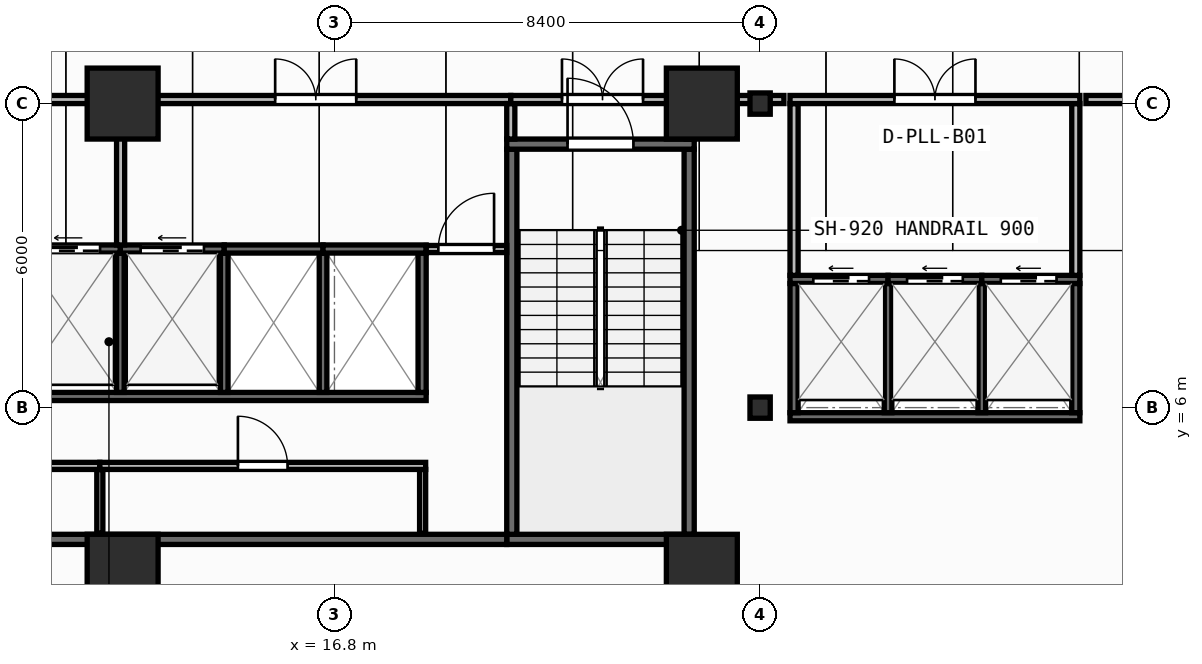
"""IFC4 building model, lengths in metres.
Left out: names, types, materials, properties, quantities, classifications, styles, units other than length and angle.
Written with IfcOpenShell. Run it as: python <this file> out.ifc"""

import sys

from ifc_helpers import new_model, si_unit, direction, frame, frame_2d, origin, origin_2d, place, context, subcontext, project, spatial, rectangle, i_section, extrude, element, fill, save


model = new_model("IFC4")
c1 = context("Model", 3, precision=1e-05, world=origin(), true_north=direction((0.0, 1.0)))
c2 = subcontext(c1, "Body", "Model", "MODEL_VIEW")
j1 = project(units=[si_unit("LENGTHUNIT", "METRE"), si_unit("PLANEANGLEUNIT", "RADIAN")], contexts=[c1])
p1 = place(None, origin())
s1 = spatial("IfcSite", under=j1, at=p1, CompositionType="ELEMENT")
p2 = place(p1, origin())
s2 = spatial("IfcBuilding", under=s1, at=p2, CompositionType="ELEMENT")
p3 = place(p2, frame((0.0, 0.0, -4.5)))
s3 = spatial("IfcBuildingStorey", under=s2, at=p3, CompositionType="ELEMENT", Elevation=-4.5)
for number, where, z_axis, x_axis in (
    (1, (12.62, 2.8, 0.0), (0.0, 0.0, 1.0), (1.0, 0.0, 0.0)),
    (2, (24.05, 2.8, 0.0), (0.0, 0.0, 1.0), (1.0, 0.0, 0.0)),
):
    element("IfcColumn", number, at=place(p3, frame(where, z_axis=z_axis, x_axis=x_axis)), inside=s3, PredefinedType="COLUMN", context=c2, shape_type="SweptSolid", body=[
        extrude(rectangle(XDim=1.4, YDim=1.4, at=origin_2d()), origin(), (0.0, 0.0, 1.0), 4.5),
    ])
p4 = place(p3, frame((25.2, 6.0, 0.0), z_axis=(0.0, 0.0, 1.0), x_axis=(1.0, 0.0, 0.0)))
e3 = element("IfcColumn", 3, at=p4, inside=s3, PredefinedType="COLUMN", context=c2, shape_type="SweptSolid", body=[
    extrude(i_section(OverallWidth=0.4, OverallDepth=0.42, WebThickness=0.025, FlangeThickness=0.04, at=origin_2d()), origin(), (0.0, 0.0, 1.0), 4.5),
])
for number, where, z_axis, x_axis in (
    (4, (12.62, 12.0, 0.0), (0.0, 0.0, 1.0), (1.0, 0.0, 0.0)),
    (5, (24.05, 12.0, 0.0), (0.0, 0.0, 1.0), (1.0, 0.0, 0.0)),
):
    element("IfcColumn", number, at=place(p3, frame(where, z_axis=z_axis, x_axis=x_axis)), inside=s3, PredefinedType="COLUMN", context=c2, shape_type="SweptSolid", body=[
        extrude(rectangle(XDim=1.4, YDim=1.4, at=origin_2d()), origin(), (0.0, 0.0, 1.0), 4.5),
    ])
p5 = place(p3, frame((25.2, 12.0, 0.0), z_axis=(0.0, 0.0, 1.0), x_axis=(1.0, 0.0, 0.0)))
e6 = element("IfcColumn", 6, at=p5, inside=s3, PredefinedType="COLUMN", context=c2, shape_type="SweptSolid", body=[
    extrude(i_section(OverallWidth=0.4, OverallDepth=0.42, WebThickness=0.025, FlangeThickness=0.04, at=origin_2d()), origin(), (0.0, 0.0, 1.0), 4.5),
])
p6 = place(p3, frame((20.2, 3.4, 0.0), z_axis=(0.0, 0.0, 1.0), x_axis=(1.0, 0.0, 0.0)))
e7 = element("IfcWall", 7, at=p6, inside=s3, PredefinedType="SHEAR", context=c2, shape_type="SweptSolid", body=[
    extrude(rectangle(XDim=3.7, YDim=0.2, at=frame_2d((1.85, 0.0))), origin(), (0.0, 0.0, 1.0), 4.25),
])
for number, where, z_axis, x_axis in (
    (8, (20.3, 3.5, 0.0), (0.0, 0.0, 1.0), (0.0, 1.0, 0.0)),
    (9, (23.8, 3.5, 0.0), (0.0, 0.0, 1.0), (0.0, 1.0, 0.0)),
):
    element("IfcWall", number, at=place(p3, frame(where, z_axis=z_axis, x_axis=x_axis)), inside=s3, PredefinedType="SHEAR", context=c2, shape_type="SweptSolid", body=[
        extrude(rectangle(XDim=7.6, YDim=0.2, at=frame_2d((3.8, 0.0))), origin(), (0.0, 0.0, 1.0), 4.25),
    ])
p7 = place(p3, frame((20.2, 11.2, 0.0), z_axis=(0.0, 0.0, 1.0), x_axis=(1.0, 0.0, 0.0)))
e10 = element("IfcWall", 10, at=p7, inside=s3, PredefinedType="SHEAR", context=c2, shape_type="SweptSolid", body=[
    extrude(rectangle(XDim=3.7, YDim=0.2, at=frame_2d((1.85, 0.0))), origin(), (0.0, 0.0, 1.0), 4.25),
])
p8 = place(p7, frame((1.2, 0.0, 0.0)))
e11 = element("IfcOpeningElement", 11, at=p8, cuts=e10, PredefinedType="OPENING", context=c2, shape_type="SweptSolid", body=[
    extrude(rectangle(XDim=1.3, YDim=2.15, at=frame_2d((0.65, 1.075))), frame((0.0, 0.11, 0.0), z_axis=(0.0, -1.0, 0.0), x_axis=(1.0, 0.0, 0.0)), (0.0, 0.0, 1.0), 0.22),
])
p9 = place(p3, frame((6.5, 3.4, 0.0), z_axis=(0.0, 0.0, 1.0), x_axis=(1.0, 0.0, 0.0)))
e12 = element("IfcWall", 12, at=p9, inside=s3, PredefinedType="SHEAR", context=c2, shape_type="SweptSolid", body=[
    extrude(rectangle(XDim=13.7, YDim=0.2, at=frame_2d((6.85, 0.0))), origin(), (0.0, 0.0, 1.0), 4.25),
])
p10 = place(p3, frame((6.5, 6.22, 0.0), z_axis=(0.0, 0.0, 1.0), x_axis=(1.0, 0.0, 0.0)))
e13 = element("IfcWall", 13, at=p10, inside=s3, PredefinedType="SHEAR", context=c2, shape_type="SweptSolid", body=[
    extrude(rectangle(XDim=12.11, YDim=0.16, at=frame_2d((6.055, 0.0))), origin(), (0.0, 0.0, 1.0), 4.25),
])
p11 = place(p3, frame((18.53, 6.3, 0.0), z_axis=(0.0, 0.0, 1.0), x_axis=(0.0, 1.0, 0.0)))
e14 = element("IfcWall", 14, at=p11, inside=s3, PredefinedType="SHEAR", context=c2, shape_type="SweptSolid", body=[
    extrude(rectangle(XDim=2.75, YDim=0.16, at=frame_2d((1.375, 0.0))), origin(), (0.0, 0.0, 1.0), 4.25),
])
for number, where, z_axis, x_axis in (
    (15, (12.575, 6.3, 0.0), (0.0, 0.0, 1.0), (0.0, 1.0, 0.0)),
    (16, (14.625, 6.3, 0.0), (0.0, 0.0, 1.0), (0.0, 1.0, 0.0)),
    (17, (16.575, 6.3, 0.0), (0.0, 0.0, 1.0), (0.0, 1.0, 0.0)),
):
    element("IfcWall", number, at=place(p3, frame(where, z_axis=z_axis, x_axis=x_axis)), inside=s3, PredefinedType="SHEAR", context=c2, shape_type="SweptSolid", body=[
        extrude(rectangle(XDim=2.75, YDim=0.15, at=frame_2d((1.375, 0.0))), origin(), (0.0, 0.0, 1.0), 4.25),
    ])
p12 = place(p3, frame((10.525, 9.13, 0.0), z_axis=(0.0, 0.0, 1.0), x_axis=(1.0, 0.0, 0.0)))
e18 = element("IfcWall", 18, at=p12, inside=s3, PredefinedType="SHEAR", context=c2, shape_type="SweptSolid", body=[
    extrude(rectangle(XDim=2.05, YDim=0.16, at=frame_2d((1.025, 0.0))), origin(), (0.0, 0.0, 1.0), 4.25),
])
p13 = place(p12, frame((0.4, 0.0, 0.0)))
e19 = element("IfcOpeningElement", 19, at=p13, cuts=e18, PredefinedType="OPENING", context=c2, shape_type="SweptSolid", body=[
    extrude(rectangle(XDim=1.25, YDim=2.15, at=frame_2d((0.625, 1.075))), frame((0.0, 0.09, 0.0), z_axis=(0.0, -1.0, 0.0), x_axis=(1.0, 0.0, 0.0)), (0.0, 0.0, 1.0), 0.18),
])
p14 = place(p3, frame((12.575, 9.13, 0.0), z_axis=(0.0, 0.0, 1.0), x_axis=(1.0, 0.0, 0.0)))
e20 = element("IfcWall", 20, at=p14, inside=s3, PredefinedType="SHEAR", context=c2, shape_type="SweptSolid", body=[
    extrude(rectangle(XDim=2.05, YDim=0.16, at=frame_2d((1.025, 0.0))), origin(), (0.0, 0.0, 1.0), 4.25),
])
p15 = place(p14, frame((0.4, 0.0, 0.0)))
e21 = element("IfcOpeningElement", 21, at=p15, cuts=e20, PredefinedType="OPENING", context=c2, shape_type="SweptSolid", body=[
    extrude(rectangle(XDim=1.25, YDim=2.15, at=frame_2d((0.625, 1.075))), frame((0.0, 0.09, 0.0), z_axis=(0.0, -1.0, 0.0), x_axis=(1.0, 0.0, 0.0)), (0.0, 0.0, 1.0), 0.18),
])
p16 = place(p3, frame((14.625, 9.13, 0.0), z_axis=(0.0, 0.0, 1.0), x_axis=(1.0, 0.0, 0.0)))
e22 = element("IfcWall", 22, at=p16, inside=s3, PredefinedType="SHEAR", context=c2, shape_type="SweptSolid", body=[
    extrude(rectangle(XDim=1.95, YDim=0.16, at=frame_2d((0.975, 0.0))), origin(), (0.0, 0.0, 1.0), 4.25),
])
p17 = place(p3, frame((16.575, 9.13, 0.0), z_axis=(0.0, 0.0, 1.0), x_axis=(1.0, 0.0, 0.0)))
e23 = element("IfcWall", 23, at=p17, inside=s3, PredefinedType="SHEAR", context=c2, shape_type="SweptSolid", body=[
    extrude(rectangle(XDim=2.035, YDim=0.16, at=frame_2d((1.018, 0.0))), origin(), (0.0, 0.0, 1.0), 4.25),
])
p18 = place(p3, frame((25.79, 5.82, 0.0), z_axis=(0.0, 0.0, 1.0), x_axis=(1.0, 0.0, 0.0)))
e24 = element("IfcWall", 24, at=p18, inside=s3, PredefinedType="SHEAR", context=c2, shape_type="SweptSolid", body=[
    extrude(rectangle(XDim=5.72, YDim=0.16, at=frame_2d((2.86, 0.0))), origin(), (0.0, 0.0, 1.0), 4.25),
])
for number, where, z_axis, x_axis in (
    (25, (25.87, 5.9, 0.0), (0.0, 0.0, 1.0), (0.0, 1.0, 0.0)),
    (26, (31.43, 5.9, 0.0), (0.0, 0.0, 1.0), (0.0, 1.0, 0.0)),
):
    element("IfcWall", number, at=place(p3, frame(where, z_axis=z_axis, x_axis=x_axis)), inside=s3, PredefinedType="SHEAR", context=c2, shape_type="SweptSolid", body=[
        extrude(rectangle(XDim=2.55, YDim=0.16, at=frame_2d((1.275, 0.0))), origin(), (0.0, 0.0, 1.0), 4.25),
    ])
for number, where, z_axis, x_axis in (
    (27, (27.725, 5.9, 0.0), (0.0, 0.0, 1.0), (0.0, 1.0, 0.0)),
    (28, (29.575, 5.9, 0.0), (0.0, 0.0, 1.0), (0.0, 1.0, 0.0)),
):
    element("IfcWall", number, at=place(p3, frame(where, z_axis=z_axis, x_axis=x_axis)), inside=s3, PredefinedType="SHEAR", context=c2, shape_type="SweptSolid", body=[
        extrude(rectangle(XDim=2.55, YDim=0.15, at=frame_2d((1.275, 0.0))), origin(), (0.0, 0.0, 1.0), 4.25),
    ])
p19 = place(p3, frame((25.79, 8.53, 0.0), z_axis=(0.0, 0.0, 1.0), x_axis=(1.0, 0.0, 0.0)))
e29 = element("IfcWall", 29, at=p19, inside=s3, PredefinedType="SHEAR", context=c2, shape_type="SweptSolid", body=[
    extrude(rectangle(XDim=1.935, YDim=0.16, at=frame_2d((0.968, 0.0))), origin(), (0.0, 0.0, 1.0), 4.25),
])
p20 = place(p19, frame((0.46, 0.0, 0.0)))
e30 = element("IfcOpeningElement", 30, at=p20, cuts=e29, PredefinedType="OPENING", context=c2, shape_type="SweptSolid", body=[
    extrude(rectangle(XDim=1.1, YDim=2.15, at=frame_2d((0.55, 1.075))), frame((0.0, 0.09, 0.0), z_axis=(0.0, -1.0, 0.0), x_axis=(1.0, 0.0, 0.0)), (0.0, 0.0, 1.0), 0.18),
])
p21 = place(p3, frame((27.725, 8.53, 0.0), z_axis=(0.0, 0.0, 1.0), x_axis=(1.0, 0.0, 0.0)))
e31 = element("IfcWall", 31, at=p21, inside=s3, PredefinedType="SHEAR", context=c2, shape_type="SweptSolid", body=[
    extrude(rectangle(XDim=1.85, YDim=0.16, at=frame_2d((0.925, 0.0))), origin(), (0.0, 0.0, 1.0), 4.25),
])
p22 = place(p21, frame((0.375, 0.0, 0.0)))
e32 = element("IfcOpeningElement", 32, at=p22, cuts=e31, PredefinedType="OPENING", context=c2, shape_type="SweptSolid", body=[
    extrude(rectangle(XDim=1.1, YDim=2.15, at=frame_2d((0.55, 1.075))), frame((0.0, 0.09, 0.0), z_axis=(0.0, -1.0, 0.0), x_axis=(1.0, 0.0, 0.0)), (0.0, 0.0, 1.0), 0.18),
])
p23 = place(p3, frame((29.575, 8.53, 0.0), z_axis=(0.0, 0.0, 1.0), x_axis=(1.0, 0.0, 0.0)))
e33 = element("IfcWall", 33, at=p23, inside=s3, PredefinedType="SHEAR", context=c2, shape_type="SweptSolid", body=[
    extrude(rectangle(XDim=1.935, YDim=0.16, at=frame_2d((0.968, 0.0))), origin(), (0.0, 0.0, 1.0), 4.25),
])
p24 = place(p23, frame((0.375, 0.0, 0.0)))
e34 = element("IfcOpeningElement", 34, at=p24, cuts=e33, PredefinedType="OPENING", context=c2, shape_type="SweptSolid", body=[
    extrude(rectangle(XDim=1.1, YDim=2.15, at=frame_2d((0.55, 1.075))), frame((0.0, 0.09, 0.0), z_axis=(0.0, -1.0, 0.0), x_axis=(1.0, 0.0, 0.0)), (0.0, 0.0, 1.0), 0.18),
])
for number, where, z_axis, x_axis in (
    (35, (12.17, 3.52, 0.0), (0.0, 0.0, 1.0), (0.0, 1.0, 0.0)),
    (36, (18.54, 3.52, 0.0), (0.0, 0.0, 1.0), (0.0, 1.0, 0.0)),
):
    element("IfcWall", number, at=place(p3, frame(where, z_axis=z_axis, x_axis=x_axis)), inside=s3, PredefinedType="PARTITIONING", context=c2, shape_type="SweptSolid", body=[
        extrude(rectangle(XDim=1.26, YDim=0.12, at=frame_2d((0.63, 0.0))), origin(), (0.0, 0.0, 1.0), 4.25),
    ])
p25 = place(p3, frame((6.5, 4.85, 0.0), z_axis=(0.0, 0.0, 1.0), x_axis=(1.0, 0.0, 0.0)))
e37 = element("IfcWall", 37, at=p25, inside=s3, PredefinedType="PARTITIONING", context=c2, shape_type="SweptSolid", body=[
    extrude(rectangle(XDim=5.67, YDim=0.14, at=frame_2d((2.835, 0.0))), origin(), (0.0, 0.0, 1.0), 4.25),
])
p26 = place(p25, frame((2.285, 0.0, 0.0)))
e38 = element("IfcOpeningElement", 38, at=p26, cuts=e37, PredefinedType="OPENING", context=c2, shape_type="SweptSolid", body=[
    extrude(rectangle(XDim=1.1, YDim=2.1, at=frame_2d((0.55, 1.05))), frame((0.0, 0.08, 0.0), z_axis=(0.0, -1.0, 0.0), x_axis=(1.0, 0.0, 0.0)), (0.0, 0.0, 1.0), 0.16),
])
p27 = place(p3, frame((12.17, 4.85, 0.0), z_axis=(0.0, 0.0, 1.0), x_axis=(1.0, 0.0, 0.0)))
e39 = element("IfcWall", 39, at=p27, inside=s3, PredefinedType="PARTITIONING", context=c2, shape_type="SweptSolid", body=[
    extrude(rectangle(XDim=6.43, YDim=0.14, at=frame_2d((3.215, 0.0))), origin(), (0.0, 0.0, 1.0), 4.25),
])
p28 = place(p27, frame((2.725, 0.0, 0.0)))
e40 = element("IfcOpeningElement", 40, at=p28, cuts=e39, PredefinedType="OPENING", context=c2, shape_type="SweptSolid", body=[
    extrude(rectangle(XDim=0.98, YDim=2.1, at=frame_2d((0.49, 1.05))), frame((0.0, 0.08, 0.0), z_axis=(0.0, -1.0, 0.0), x_axis=(1.0, 0.0, 0.0)), (0.0, 0.0, 1.0), 0.16),
])
p29 = place(p3, frame((18.61, 9.13, 0.0), z_axis=(0.0, 0.0, 1.0), x_axis=(1.0, 0.0, 0.0)))
e41 = element("IfcWall", 41, at=p29, inside=s3, PredefinedType="PARTITIONING", context=c2, shape_type="SweptSolid", body=[
    extrude(rectangle(XDim=1.59, YDim=0.14, at=frame_2d((0.795, 0.0))), origin(), (0.0, 0.0, 1.0), 4.25),
])
p30 = place(p29, frame((0.24, 0.0, 0.0)))
e42 = element("IfcOpeningElement", 42, at=p30, cuts=e41, PredefinedType="OPENING", context=c2, shape_type="SweptSolid", body=[
    extrude(rectangle(XDim=1.1, YDim=2.1, at=frame_2d((0.55, 1.05))), frame((0.0, 0.08, 0.0), z_axis=(0.0, -1.0, 0.0), x_axis=(1.0, 0.0, 0.0)), (0.0, 0.0, 1.0), 0.16),
])
p31 = place(p3, frame((6.4, 12.08, 0.0), z_axis=(0.0, 0.0, 1.0), x_axis=(1.0, 0.0, 0.0)))
e43 = element("IfcWall", 43, at=p31, inside=s3, PredefinedType="PARTITIONING", context=c2, shape_type="SweptSolid", body=[
    extrude(rectangle(XDim=6.18, YDim=0.16, at=frame_2d((3.09, 0.0))), origin(), (0.0, 0.0, 1.0), 3.315),
])
p32 = place(p31, frame((2.29, 0.0, 0.0)))
e44 = element("IfcOpeningElement", 44, at=p32, cuts=e43, PredefinedType="OPENING", context=c2, shape_type="SweptSolid", body=[
    extrude(rectangle(XDim=1.6, YDim=2.05, at=frame_2d((0.8, 1.025))), frame((0.0, 0.09, 0.0), z_axis=(0.0, -1.0, 0.0), x_axis=(1.0, 0.0, 0.0)), (0.0, 0.0, 1.0), 0.18),
])
p33 = place(p3, frame((12.58, 9.21, 0.0), z_axis=(0.0, 0.0, 1.0), x_axis=(0.0, 1.0, 0.0)))
e45 = element("IfcWall", 45, at=p33, inside=s3, PredefinedType="PARTITIONING", context=c2, shape_type="SweptSolid", body=[
    extrude(rectangle(XDim=2.79, YDim=0.16, at=frame_2d((1.395, 0.0))), origin(), (0.0, 0.0, 1.0), 4.25),
])
p34 = place(p3, frame((12.58, 12.08, 0.0), z_axis=(0.0, 0.0, 1.0), x_axis=(1.0, 0.0, 0.0)))
e46 = element("IfcWall", 46, at=p34, inside=s3, PredefinedType="PARTITIONING", context=c2, shape_type="SweptSolid", body=[
    extrude(rectangle(XDim=7.7, YDim=0.16, at=frame_2d((3.85, 0.0))), origin(), (0.0, 0.0, 1.0), 3.315),
])
p35 = place(p34, frame((3.05, 0.0, 0.0)))
e47 = element("IfcOpeningElement", 47, at=p35, cuts=e46, PredefinedType="OPENING", context=c2, shape_type="SweptSolid", body=[
    extrude(rectangle(XDim=1.6, YDim=2.05, at=frame_2d((0.8, 1.025))), frame((0.0, 0.09, 0.0), z_axis=(0.0, -1.0, 0.0), x_axis=(1.0, 0.0, 0.0)), (0.0, 0.0, 1.0), 0.18),
])
p36 = place(p3, frame((20.28, 11.3, 0.0), z_axis=(0.0, 0.0, 1.0), x_axis=(0.0, 1.0, 0.0)))
e48 = element("IfcWall", 48, at=p36, inside=s3, PredefinedType="PARTITIONING", context=c2, shape_type="SweptSolid", body=[
    extrude(rectangle(XDim=0.7, YDim=0.16, at=frame_2d((0.35, 0.0))), origin(), (0.0, 0.0, 1.0), 4.25),
])
p37 = place(p3, frame((20.28, 12.08, 0.0), z_axis=(0.0, 0.0, 1.0), x_axis=(1.0, 0.0, 0.0)))
e49 = element("IfcWall", 49, at=p37, inside=s3, PredefinedType="PARTITIONING", context=c2, shape_type="SweptSolid", body=[
    extrude(rectangle(XDim=3.62, YDim=0.16, at=frame_2d((1.81, 0.0))), origin(), (0.0, 0.0, 1.0), 3.315),
])
p38 = place(p37, frame((1.01, 0.0, 0.0)))
e50 = element("IfcOpeningElement", 50, at=p38, cuts=e49, PredefinedType="OPENING", context=c2, shape_type="SweptSolid", body=[
    extrude(rectangle(XDim=1.6, YDim=2.05, at=frame_2d((0.8, 1.025))), frame((0.0, 0.09, 0.0), z_axis=(0.0, -1.0, 0.0), x_axis=(1.0, 0.0, 0.0)), (0.0, 0.0, 1.0), 0.18),
])
p39 = place(p3, frame((23.82, 11.3, 0.0), z_axis=(0.0, 0.0, 1.0), x_axis=(0.0, 1.0, 0.0)))
e51 = element("IfcWall", 51, at=p39, inside=s3, PredefinedType="PARTITIONING", context=c2, shape_type="SweptSolid", body=[
    extrude(rectangle(XDim=0.7, YDim=0.16, at=frame_2d((0.35, 0.0))), origin(), (0.0, 0.0, 1.0), 4.25),
])
for number, where, z_axis, x_axis in (
    (52, (25.87, 8.61, 0.0), (0.0, 0.0, 1.0), (0.0, 1.0, 0.0)),
    (53, (31.43, 8.61, 0.0), (0.0, 0.0, 1.0), (0.0, 1.0, 0.0)),
):
    element("IfcWall", number, at=place(p3, frame(where, z_axis=z_axis, x_axis=x_axis)), inside=s3, PredefinedType="PARTITIONING", context=c2, shape_type="SweptSolid", body=[
        extrude(rectangle(XDim=3.39, YDim=0.16, at=frame_2d((1.695, 0.0))), origin(), (0.0, 0.0, 1.0), 4.25),
    ])
p40 = place(p3, frame((25.79, 12.08, 0.0), z_axis=(0.0, 0.0, 1.0), x_axis=(1.0, 0.0, 0.0)))
e54 = element("IfcWall", 54, at=p40, inside=s3, PredefinedType="PARTITIONING", context=c2, shape_type="SweptSolid", body=[
    extrude(rectangle(XDim=5.72, YDim=0.16, at=frame_2d((2.86, 0.0))), origin(), (0.0, 0.0, 1.0), 3.315),
])
p41 = place(p40, frame((2.06, 0.0, 0.0)))
e55 = element("IfcOpeningElement", 55, at=p41, cuts=e54, PredefinedType="OPENING", context=c2, shape_type="SweptSolid", body=[
    extrude(rectangle(XDim=1.6, YDim=2.05, at=frame_2d((0.8, 1.025))), frame((0.0, 0.09, 0.0), z_axis=(0.0, -1.0, 0.0), x_axis=(1.0, 0.0, 0.0)), (0.0, 0.0, 1.0), 0.18),
])
p42 = place(p3, frame((24.02, 12.08, 0.0), z_axis=(0.0, 0.0, 1.0), x_axis=(1.0, 0.0, 0.0)))
e56 = element("IfcWall", 56, at=p42, inside=s3, PredefinedType="PARTITIONING", context=c2, shape_type="SweptSolid", body=[
    extrude(rectangle(XDim=1.65, YDim=0.16, at=frame_2d((0.825, 0.0))), origin(), (0.0, 0.0, 1.0), 3.315),
])
p43 = place(p3, frame((31.63, 12.08, 0.0), z_axis=(0.0, 0.0, 1.0), x_axis=(1.0, 0.0, 0.0)))
e57 = element("IfcWall", 57, at=p43, inside=s3, PredefinedType="PARTITIONING", context=c2, shape_type="SweptSolid", body=[
    extrude(rectangle(XDim=3.51, YDim=0.16, at=frame_2d((1.755, 0.0))), origin(), (0.0, 0.0, 1.0), 3.315),
])
p44 = place(p8, origin())
e58 = element("IfcDoor", 58, at=p44, inside=s3, OperationType="SINGLE_SWING_LEFT", PredefinedType="DOOR", context=c2, shape_type="SweptSolid", body=[
    extrude(rectangle(XDim=1.3, YDim=2.15, at=frame_2d((0.65, 1.075))), frame((0.0, 0.025, 0.0), z_axis=(0.0, -1.0, 0.0), x_axis=(1.0, 0.0, 0.0)), (0.0, 0.0, 1.0), 0.05),
])
fill(e11, e58)
p45 = place(p13, origin())
e59 = element("IfcDoor", 59, at=p45, inside=s3, OperationType="SLIDING_TO_LEFT", PredefinedType="DOOR", context=c2, shape_type="SweptSolid", body=[
    extrude(rectangle(XDim=1.25, YDim=2.15, at=frame_2d((0.625, 1.075))), frame((0.0, 0.025, 0.0), z_axis=(0.0, -1.0, 0.0), x_axis=(1.0, 0.0, 0.0)), (0.0, 0.0, 1.0), 0.05),
])
fill(e19, e59)
p46 = place(p15, origin())
e60 = element("IfcDoor", 60, at=p46, inside=s3, OperationType="SLIDING_TO_LEFT", PredefinedType="DOOR", context=c2, shape_type="SweptSolid", body=[
    extrude(rectangle(XDim=1.25, YDim=2.15, at=frame_2d((0.625, 1.075))), frame((0.0, 0.025, 0.0), z_axis=(0.0, -1.0, 0.0), x_axis=(1.0, 0.0, 0.0)), (0.0, 0.0, 1.0), 0.05),
])
fill(e21, e60)
p47 = place(p20, origin())
e61 = element("IfcDoor", 61, at=p47, inside=s3, OperationType="SLIDING_TO_LEFT", PredefinedType="DOOR", context=c2, shape_type="SweptSolid", body=[
    extrude(rectangle(XDim=1.1, YDim=2.15, at=frame_2d((0.55, 1.075))), frame((0.0, 0.025, 0.0), z_axis=(0.0, -1.0, 0.0), x_axis=(1.0, 0.0, 0.0)), (0.0, 0.0, 1.0), 0.05),
])
fill(e30, e61)
p48 = place(p22, origin())
e62 = element("IfcDoor", 62, at=p48, inside=s3, OperationType="SLIDING_TO_LEFT", PredefinedType="DOOR", context=c2, shape_type="SweptSolid", body=[
    extrude(rectangle(XDim=1.1, YDim=2.15, at=frame_2d((0.55, 1.075))), frame((0.0, 0.025, 0.0), z_axis=(0.0, -1.0, 0.0), x_axis=(1.0, 0.0, 0.0)), (0.0, 0.0, 1.0), 0.05),
])
fill(e32, e62)
p49 = place(p24, origin())
e63 = element("IfcDoor", 63, at=p49, inside=s3, OperationType="SLIDING_TO_LEFT", PredefinedType="DOOR", context=c2, shape_type="SweptSolid", body=[
    extrude(rectangle(XDim=1.1, YDim=2.15, at=frame_2d((0.55, 1.075))), frame((0.0, 0.025, 0.0), z_axis=(0.0, -1.0, 0.0), x_axis=(1.0, 0.0, 0.0)), (0.0, 0.0, 1.0), 0.05),
])
fill(e34, e63)
p50 = place(p28, origin())
e64 = element("IfcDoor", 64, at=p50, inside=s3, OperationType="SINGLE_SWING_LEFT", PredefinedType="DOOR", context=c2, shape_type="SweptSolid", body=[
    extrude(rectangle(XDim=0.98, YDim=2.1, at=frame_2d((0.49, 1.05))), frame((0.0, 0.025, 0.0), z_axis=(0.0, -1.0, 0.0), x_axis=(1.0, 0.0, 0.0)), (0.0, 0.0, 1.0), 0.05),
])
fill(e40, e64)
p51 = place(p30, origin())
e65 = element("IfcDoor", 65, at=p51, inside=s3, OperationType="SINGLE_SWING_RIGHT", PredefinedType="DOOR", context=c2, shape_type="SweptSolid", body=[
    extrude(rectangle(XDim=1.1, YDim=2.1, at=frame_2d((0.55, 1.05))), frame((0.0, 0.025, 0.0), z_axis=(0.0, -1.0, 0.0), x_axis=(1.0, 0.0, 0.0)), (0.0, 0.0, 1.0), 0.05),
])
fill(e42, e65)
p52 = place(p35, origin())
e66 = element("IfcDoor", 66, at=p52, inside=s3, OperationType="DOUBLE_DOOR_SINGLE_SWING", PredefinedType="DOOR", context=c2, shape_type="SweptSolid", body=[
    extrude(rectangle(XDim=1.6, YDim=2.05, at=frame_2d((0.8, 1.025))), frame((0.0, 0.025, 0.0), z_axis=(0.0, -1.0, 0.0), x_axis=(1.0, 0.0, 0.0)), (0.0, 0.0, 1.0), 0.05),
])
fill(e47, e66)
p53 = place(p38, origin())
e67 = element("IfcDoor", 67, at=p53, inside=s3, OperationType="DOUBLE_DOOR_SINGLE_SWING", PredefinedType="DOOR", context=c2, shape_type="SweptSolid", body=[
    extrude(rectangle(XDim=1.6, YDim=2.05, at=frame_2d((0.8, 1.025))), frame((0.0, 0.025, 0.0), z_axis=(0.0, -1.0, 0.0), x_axis=(1.0, 0.0, 0.0)), (0.0, 0.0, 1.0), 0.05),
])
fill(e50, e67)
p54 = place(p41, origin())
e68 = element("IfcDoor", 68, at=p54, inside=s3, OperationType="DOUBLE_DOOR_SINGLE_SWING", PredefinedType="DOOR", context=c2, shape_type="SweptSolid", body=[
    extrude(rectangle(XDim=1.6, YDim=2.05, at=frame_2d((0.8, 1.025))), frame((0.0, 0.025, 0.0), z_axis=(0.0, -1.0, 0.0), x_axis=(1.0, 0.0, 0.0)), (0.0, 0.0, 1.0), 0.05),
])
fill(e55, e68)
save(model, sys.argv[1])
